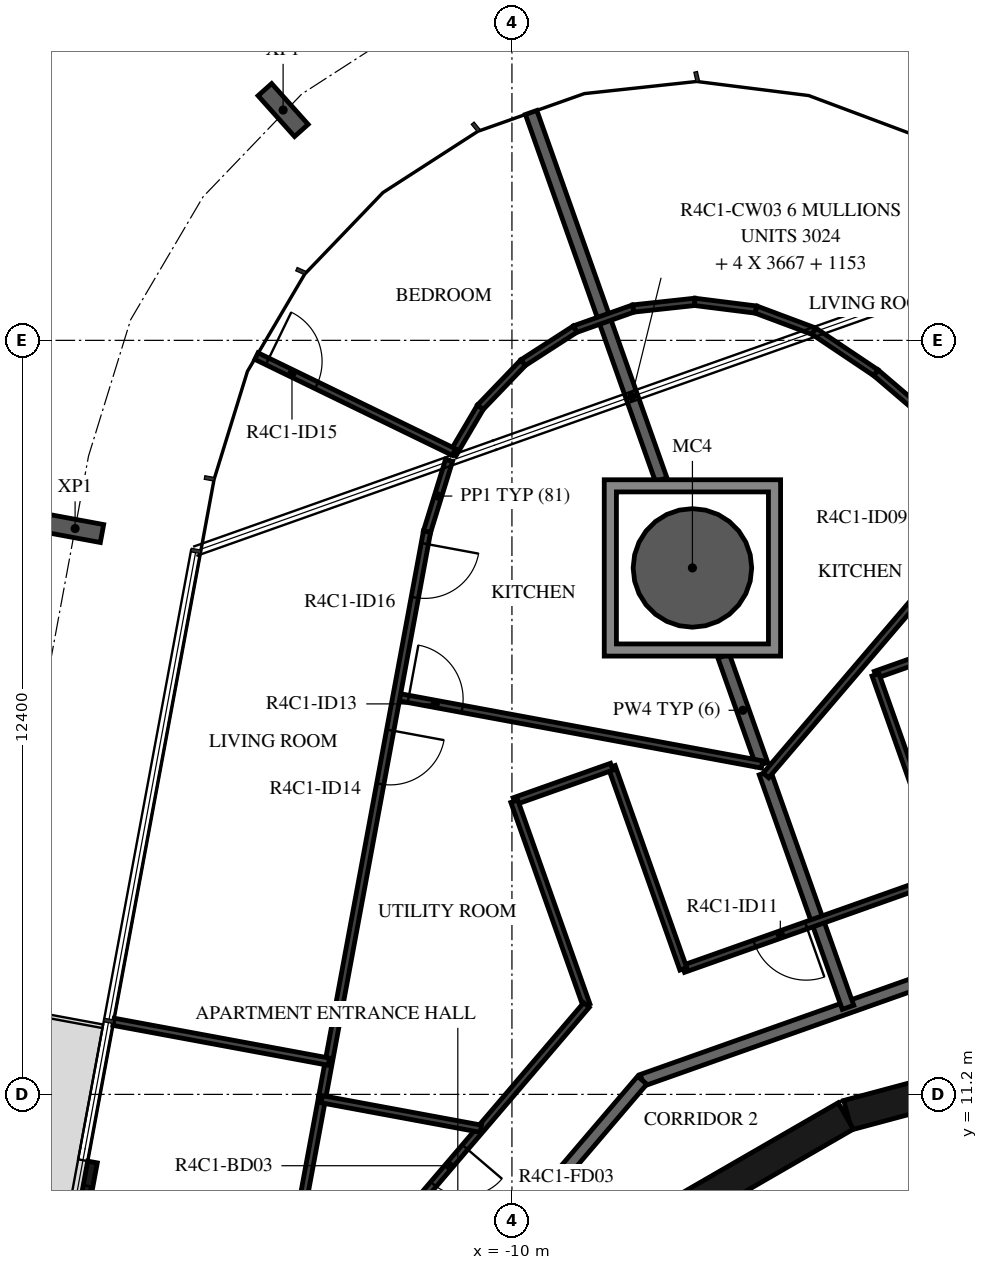
"""IFC4 building model, lengths in metres.
Left out: names, types, materials, properties, quantities, classifications, styles, units other than length and angle.
Written with IfcOpenShell. Run it as: python <this file> out.ifc"""

import sys

from ifc_helpers import new_model, si_unit, direction, frame, frame_2d, origin, origin_2d, place, context, subcontext, project, spatial, polyline, rectangle, hollow_circle, i_section, outline, extrude, element, fill, save


model = new_model("IFC4")
c1 = context("Model", 3, precision=1e-05, world=origin(), true_north=direction((0.0, 1.0)))
c2 = subcontext(c1, "Body", "Model", "MODEL_VIEW")
j1 = project(units=[si_unit("LENGTHUNIT", "METRE"), si_unit("PLANEANGLEUNIT", "RADIAN")], contexts=[c1])
p1 = place(None, origin())
s1 = spatial("IfcSite", under=j1, at=p1, CompositionType="ELEMENT")
p2 = place(p1, origin())
s2 = spatial("IfcBuilding", under=s1, at=p2, CompositionType="ELEMENT")
p3 = place(p2, frame((0.0, 0.0, 176.2)))
s3 = spatial("IfcBuildingStorey", under=s2, at=p3, CompositionType="ELEMENT", Elevation=176.2)
p4 = place(p3, frame((-7.032, 19.858, -0.38), z_axis=(0.0, 0.0, 1.0), x_axis=(1.0, 0.0, 0.0)))
e1 = element("IfcColumn", 1, at=p4, inside=s3, PredefinedType="COLUMN", context=c2, shape_type="SweptSolid", body=[
    extrude(hollow_circle(Radius=0.975, WallThickness=0.045, at=origin_2d()), origin(), (0.0, 0.0, 1.0), 3.5),
])
for number, where, z_axis, x_axis in (
    (2, (-13.763, 27.387, -0.38), (0.0, 0.0, 1.0), (0.746, 0.666, 0.0)),
    (3, (-17.184, 20.505, -0.38), (0.0, 0.0, 1.0), (0.182, 0.983, 0.0)),
):
    element("IfcColumn", number, at=place(p3, frame(where, z_axis=z_axis, x_axis=x_axis)), inside=s3, PredefinedType="COLUMN", context=c2, shape_type="SweptSolid", body=[
        extrude(i_section(OverallWidth=0.3, OverallDepth=0.9, WebThickness=0.019, FlangeThickness=0.035, FilletRadius=0.03, at=origin_2d()), origin(), (0.0, 0.0, 1.0), 3.5),
    ])
p5 = place(p3, frame((-16.897, 10.088, 0.0), z_axis=(0.0, 0.0, 1.0), x_axis=(-0.18226136951, -0.983250117307, 0.0)))
e4 = element("IfcWall", 4, at=p5, inside=s3, PredefinedType="STANDARD", context=c2, shape_type="SweptSolid", body=[
    extrude(rectangle(XDim=3.2, YDim=0.16, at=frame_2d((1.6, 0.0))), origin(), (0.0, 0.0, 1.0), 3.12),
])
p6 = place(p5, frame((0.4, 0.0, 0.0)))
e5 = element("IfcOpeningElement", 5, at=p6, cuts=e4, PredefinedType="OPENING", context=c2, shape_type="SweptSolid", body=[
    extrude(rectangle(XDim=2.4, YDim=2.4, at=frame_2d((1.2, 1.2))), frame((0.0, 0.09, 0.0), z_axis=(0.0, -1.0, 0.0), x_axis=(1.0, 0.0, 0.0)), (0.0, 0.0, 1.0), 0.18),
])
for number, where, z_axis, x_axis in (
    (6, (-1.55, 11.643, 0.0), (0.0, 0.0, 1.0), (-0.966, -0.259, 0.0)),
    (7, (-4.51, 10.845, 0.0), (0.0, 0.0, 1.0), (-0.866, -0.5, 0.0)),
):
    element("IfcWall", number, at=place(p3, frame(where, z_axis=z_axis, x_axis=x_axis)), inside=s3, PredefinedType="SHEAR", context=c2, shape_type="SweptSolid", body=[
        extrude(rectangle(XDim=3.033, YDim=0.5, at=frame_2d((1.516, 0.0))), origin(), (0.0, 0.0, 1.0), 3.12),
    ])
p7 = place(p3, frame((-2.359, 13.38, 0.0), z_axis=(0.0, 0.0, 1.0), x_axis=(-0.942647529236, -0.333789807551, 0.0)))
e8 = element("IfcWall", 8, at=p7, inside=s3, PredefinedType="STANDARD", context=c2, shape_type="SweptSolid", body=[
    extrude(rectangle(XDim=5.833, YDim=0.2, at=frame_2d((2.917, 0.0))), origin(), (0.0, 0.0, 1.0), 3.12),
])
p8 = place(p3, frame((-7.858, 11.433, 0.0), z_axis=(0.0, 0.0, 1.0), x_axis=(-0.649440801937, -0.760412154545, 0.0)))
e9 = element("IfcWall", 9, at=p8, inside=s3, PredefinedType="STANDARD", context=c2, shape_type="SweptSolid", body=[
    extrude(rectangle(XDim=7.181, YDim=0.2, at=frame_2d((3.59, 0.0))), origin(), (0.0, 0.0, 1.0), 3.12),
])
p9 = place(p8, frame((2.6, 0.0, 0.0)))
e10 = element("IfcOpeningElement", 10, at=p9, cuts=e9, PredefinedType="OPENING", context=c2, shape_type="SweptSolid", body=[
    extrude(rectangle(XDim=1.0, YDim=2.1, at=frame_2d((0.5, 1.05))), frame((0.0, 0.11, 0.0), z_axis=(0.0, -1.0, 0.0), x_axis=(1.0, 0.0, 0.0)), (0.0, 0.0, 1.0), 0.22),
])
p10 = place(p3, frame((-5.839, 16.488, 0.0), z_axis=(0.0, 0.0, 1.0), x_axis=(0.333840515054, -0.942629572265, 0.0)))
e11 = element("IfcWall", 11, at=p10, inside=s3, PredefinedType="STANDARD", context=c2, shape_type="SweptSolid", body=[
    extrude(rectangle(XDim=4.092, YDim=0.2, at=frame_2d((2.046, 0.0))), origin(), (0.0, 0.0, 1.0), 3.12),
])
p11 = place(p3, frame((-9.684, 27.348, 0.0), z_axis=(0.0, 0.0, 1.0), x_axis=(0.333810465454, -0.942640214055, 0.0)))
e12 = element("IfcWall", 12, at=p11, inside=s3, PredefinedType="STANDARD", context=c2, shape_type="SweptSolid", body=[
    extrude(rectangle(XDim=6.407, YDim=0.2, at=frame_2d((3.204, 0.0))), origin(), (0.0, 0.0, 1.0), 3.12),
])
p12 = place(p3, frame((-6.518, 18.408, 0.0), z_axis=(0.0, 0.0, 1.0), x_axis=(0.333725210903, -0.942670400303, 0.0)))
e13 = element("IfcWall", 13, at=p12, inside=s3, PredefinedType="STANDARD", context=c2, shape_type="SweptSolid", body=[
    extrude(rectangle(XDim=1.89, YDim=0.2, at=frame_2d((0.945, 0.0))), origin(), (0.0, 0.0, 1.0), 3.12),
])
p13 = place(p3, frame((8.702, 12.206, 0.0), z_axis=(0.0, 0.0, 1.0), x_axis=(-0.760401313718, 0.649453494945, 0.0)))
e14 = element("IfcWall", 14, at=p13, inside=s3, PredefinedType="PARTITIONING", context=c2, shape_type="SweptSolid", body=[
    extrude(rectangle(XDim=16.724, YDim=0.12, at=frame_2d((8.362, 0.0))), origin(), (0.0, 0.0, 1.0), 3.12),
])
p14 = place(p13, frame((0.2, 0.0, 0.0)))
e15 = element("IfcOpeningElement", 15, at=p14, cuts=e14, PredefinedType="OPENING", context=c2, shape_type="SweptSolid", body=[
    extrude(rectangle(XDim=0.9, YDim=2.1, at=frame_2d((0.45, 1.05))), frame((0.0, 0.07, 0.0), z_axis=(0.0, -1.0, 0.0), x_axis=(1.0, 0.0, 0.0)), (0.0, 0.0, 1.0), 0.14),
])
p15 = place(p13, frame((8.02, 0.0, 0.0)))
e16 = element("IfcOpeningElement", 16, at=p15, cuts=e14, PredefinedType="OPENING", context=c2, shape_type="SweptSolid", body=[
    extrude(rectangle(XDim=0.9, YDim=2.1, at=frame_2d((0.45, 1.05))), frame((0.0, 0.07, 0.0), z_axis=(0.0, -1.0, 0.0), x_axis=(1.0, 0.0, 0.0)), (0.0, 0.0, 1.0), 0.14),
])
p16 = place(p13, frame((14.412, 0.0, 0.0)))
e17 = element("IfcOpeningElement", 17, at=p16, cuts=e14, PredefinedType="OPENING", context=c2, shape_type="SweptSolid", body=[
    extrude(rectangle(XDim=0.9, YDim=2.1, at=frame_2d((0.45, 1.05))), frame((0.0, 0.07, 0.0), z_axis=(0.0, -1.0, 0.0), x_axis=(1.0, 0.0, 0.0)), (0.0, 0.0, 1.0), 0.14),
])
p17 = place(p3, frame((-2.419, 18.668, 0.0), z_axis=(0.0, 0.0, 1.0), x_axis=(-0.942661115325, -0.333751436931, 0.0)))
e18 = element("IfcWall", 18, at=p17, inside=s3, PredefinedType="PARTITIONING", context=c2, shape_type="SweptSolid", body=[
    extrude(rectangle(XDim=1.7, YDim=0.12, at=frame_2d((0.85, 0.0))), origin(), (0.0, 0.0, 1.0), 3.12),
])
p18 = place(p3, frame((-4.021, 18.101, 0.0), z_axis=(0.0, 0.0, 1.0), x_axis=(0.333811035895, -0.942640012048, 0.0)))
e19 = element("IfcWall", 19, at=p18, inside=s3, PredefinedType="PARTITIONING", context=c2, shape_type="SweptSolid", body=[
    extrude(rectangle(XDim=3.505, YDim=0.12, at=frame_2d((1.752, 0.0))), origin(), (0.0, 0.0, 1.0), 3.12),
])
p19 = place(p3, frame((-2.852, 14.797, 0.0), z_axis=(0.0, 0.0, 1.0), x_axis=(-0.942629664375, -0.333840254973, 0.0)))
e20 = element("IfcWall", 20, at=p19, inside=s3, PredefinedType="PARTITIONING", context=c2, shape_type="SweptSolid", body=[
    extrude(rectangle(XDim=4.593, YDim=0.12, at=frame_2d((2.297, 0.0))), origin(), (0.0, 0.0, 1.0), 3.12),
])
p20 = place(p19, frame((2.451, 0.0, 0.0)))
e21 = element("IfcOpeningElement", 21, at=p20, cuts=e20, PredefinedType="OPENING", context=c2, shape_type="SweptSolid", body=[
    extrude(rectangle(XDim=0.9, YDim=2.1, at=frame_2d((0.45, 1.05))), frame((0.0, 0.07, 0.0), z_axis=(0.0, -1.0, 0.0), x_axis=(1.0, 0.0, 0.0)), (0.0, 0.0, 1.0), 0.14),
])
p21 = place(p3, frame((-1.79, 21.167, 0.0), z_axis=(0.0, 0.0, 1.0), x_axis=(-0.649456490412, -0.7603987553, 0.0)))
e22 = element("IfcWall", 22, at=p21, inside=s3, PredefinedType="PARTITIONING", context=c2, shape_type="SweptSolid", body=[
    extrude(rectangle(XDim=6.21, YDim=0.12, at=frame_2d((3.105, 0.0))), origin(), (0.0, 0.0, 1.0), 3.12),
])
p22 = place(p21, frame((0.2, 0.0, 0.0)))
e23 = element("IfcOpeningElement", 23, at=p22, cuts=e22, PredefinedType="OPENING", context=c2, shape_type="SweptSolid", body=[
    extrude(rectangle(XDim=0.9, YDim=2.1, at=frame_2d((0.45, 1.05))), frame((0.0, 0.07, 0.0), z_axis=(0.0, -1.0, 0.0), x_axis=(1.0, 0.0, 0.0)), (0.0, 0.0, 1.0), 0.14),
])
p23 = place(p3, frame((-8.961, 23.785, 0.0), z_axis=(0.0, 0.0, 1.0), x_axis=(0.942630376568, 0.333838244022, 0.0)))
e24 = element("IfcWall", 24, at=p23, inside=s3, PredefinedType="PARTITIONING", context=c2, shape_type="SweptSolid", body=[
    extrude(rectangle(XDim=1.016, YDim=0.12, at=frame_2d((0.508, 0.0))), origin(), (0.0, 0.0, 1.0), 3.12),
])
p24 = place(p3, frame((-8.004, 24.124, 0.0), z_axis=(0.0, 0.0, 1.0), x_axis=(0.994216064839, 0.107398400431, 0.0)))
e25 = element("IfcWall", 25, at=p24, inside=s3, PredefinedType="PARTITIONING", context=c2, shape_type="SweptSolid", body=[
    extrude(rectangle(XDim=1.016, YDim=0.12, at=frame_2d((0.508, 0.0))), origin(), (0.0, 0.0, 1.0), 3.12),
])
p25 = place(p3, frame((-6.994, 24.233, 0.0), z_axis=(0.0, 0.0, 1.0), x_axis=(0.992188875952, -0.124744676991, 0.0)))
e26 = element("IfcWall", 26, at=p25, inside=s3, PredefinedType="PARTITIONING", context=c2, shape_type="SweptSolid", body=[
    extrude(rectangle(XDim=1.016, YDim=0.12, at=frame_2d((0.508, 0.0))), origin(), (0.0, 0.0, 1.0), 3.12),
])
p26 = place(p3, frame((-5.986, 24.106, 0.0), z_axis=(0.0, 0.0, 1.0), x_axis=(0.936625084254, -0.350333343469, 0.0)))
e27 = element("IfcWall", 27, at=p26, inside=s3, PredefinedType="PARTITIONING", context=c2, shape_type="SweptSolid", body=[
    extrude(rectangle(XDim=1.016, YDim=0.12, at=frame_2d((0.508, 0.0))), origin(), (0.0, 0.0, 1.0), 3.12),
])
p27 = place(p3, frame((-5.034, 23.75, 0.0), z_axis=(0.0, 0.0, 1.0), x_axis=(0.83070096574, -0.556718874764, 0.0)))
e28 = element("IfcWall", 28, at=p27, inside=s3, PredefinedType="PARTITIONING", context=c2, shape_type="SweptSolid", body=[
    extrude(rectangle(XDim=1.227, YDim=0.12, at=frame_2d((0.614, 0.0))), origin(), (0.0, 0.0, 1.0), 3.12),
])
p28 = place(p3, frame((-7.181, 13.263, 0.0), z_axis=(0.0, 0.0, 1.0), x_axis=(-0.333822798183, 0.942635846663, 0.0)))
e29 = element("IfcWall", 29, at=p28, inside=s3, PredefinedType="PARTITIONING", context=c2, shape_type="SweptSolid", body=[
    extrude(rectangle(XDim=3.527, YDim=0.12, at=frame_2d((1.764, 0.0))), origin(), (0.0, 0.0, 1.0), 3.12),
])
p29 = place(p3, frame((-8.359, 16.588, 0.0), z_axis=(0.0, 0.0, 1.0), x_axis=(-0.942661115325, -0.333751436931, 0.0)))
e30 = element("IfcWall", 30, at=p29, inside=s3, PredefinedType="PARTITIONING", context=c2, shape_type="SweptSolid", body=[
    extrude(rectangle(XDim=1.7, YDim=0.12, at=frame_2d((0.85, 0.0))), origin(), (0.0, 0.0, 1.0), 3.12),
])
p30 = place(p3, frame((-9.961, 16.021, 0.0), z_axis=(0.0, 0.0, 1.0), x_axis=(0.333803930912, -0.94264252806, 0.0)))
e31 = element("IfcWall", 31, at=p30, inside=s3, PredefinedType="PARTITIONING", context=c2, shape_type="SweptSolid", body=[
    extrude(rectangle(XDim=3.556, YDim=0.12, at=frame_2d((1.778, 0.0))), origin(), (0.0, 0.0, 1.0), 3.12),
])
p31 = place(p3, frame((-8.774, 12.669, 0.0), z_axis=(0.0, 0.0, 1.0), x_axis=(-0.649446157105, -0.760407580855, 0.0)))
e32 = element("IfcWall", 32, at=p31, inside=s3, PredefinedType="PARTITIONING", context=c2, shape_type="SweptSolid", body=[
    extrude(rectangle(XDim=7.927, YDim=0.12, at=frame_2d((3.964, 0.0))), origin(), (0.0, 0.0, 1.0), 3.12),
])
p32 = place(p31, frame((3.074, 0.0, 0.0)))
e33 = element("IfcOpeningElement", 33, at=p32, cuts=e32, PredefinedType="OPENING", context=c2, shape_type="SweptSolid", body=[
    extrude(rectangle(XDim=0.8, YDim=2.1, at=frame_2d((0.4, 1.05))), frame((0.0, 0.07, 0.0), z_axis=(0.0, -1.0, 0.0), x_axis=(1.0, 0.0, 0.0)), (0.0, 0.0, 1.0), 0.14),
])
p33 = place(p3, frame((-13.955, 6.647, 0.0), z_axis=(0.0, 0.0, 1.0), x_axis=(0.182264522222, 0.983249532896, 0.0)))
e34 = element("IfcWall", 34, at=p33, inside=s3, PredefinedType="PARTITIONING", context=c2, shape_type="SweptSolid", body=[
    extrude(rectangle(XDim=4.589, YDim=0.12, at=frame_2d((2.294, 0.0))), origin(), (0.0, 0.0, 1.0), 3.12),
])
p34 = place(p3, frame((-10.974, 21.728, 0.0), z_axis=(0.0, 0.0, 1.0), x_axis=(0.507353148194, 0.861738233466, 0.0)))
e35 = element("IfcWall", 35, at=p34, inside=s3, PredefinedType="PARTITIONING", context=c2, shape_type="SweptSolid", body=[
    extrude(rectangle(XDim=0.897, YDim=0.12, at=frame_2d((0.448, 0.0))), origin(), (0.0, 0.0, 1.0), 3.12),
])
p35 = place(p3, frame((-10.519, 22.501, 0.0), z_axis=(0.0, 0.0, 1.0), x_axis=(0.69266189308, 0.721262436201, 0.0)))
e36 = element("IfcWall", 36, at=p35, inside=s3, PredefinedType="PARTITIONING", context=c2, shape_type="SweptSolid", body=[
    extrude(rectangle(XDim=1.016, YDim=0.12, at=frame_2d((0.508, 0.0))), origin(), (0.0, 0.0, 1.0), 3.12),
])
p36 = place(p3, frame((-9.815, 23.234, 0.0), z_axis=(0.0, 0.0, 1.0), x_axis=(0.840310772539, 0.542104976508, 0.0)))
e37 = element("IfcWall", 37, at=p36, inside=s3, PredefinedType="PARTITIONING", context=c2, shape_type="SweptSolid", body=[
    extrude(rectangle(XDim=1.016, YDim=0.12, at=frame_2d((0.508, 0.0))), origin(), (0.0, 0.0, 1.0), 3.12),
])
p37 = place(p3, frame((-14.202, 23.341, 0.0), z_axis=(0.0, 0.0, 1.0), x_axis=(0.899466404534, -0.436989916491, 0.0)))
e38 = element("IfcWall", 38, at=p37, inside=s3, PredefinedType="PARTITIONING", context=c2, shape_type="SweptSolid", body=[
    extrude(rectangle(XDim=3.611, YDim=0.12, at=frame_2d((1.806, 0.0))), origin(), (0.0, 0.0, 1.0), 3.12),
])
p38 = place(p37, frame((0.2, 0.0, 0.0)))
e39 = element("IfcOpeningElement", 39, at=p38, cuts=e38, PredefinedType="OPENING", context=c2, shape_type="SweptSolid", body=[
    extrude(rectangle(XDim=0.9, YDim=2.1, at=frame_2d((0.45, 1.05))), frame((0.0, 0.07, 0.0), z_axis=(0.0, -1.0, 0.0), x_axis=(1.0, 0.0, 0.0)), (0.0, 0.0, 1.0), 0.14),
])
p39 = place(p3, frame((-11.899, 17.74, 0.0), z_axis=(0.0, 0.0, 1.0), x_axis=(0.983254721409, -0.182236529889, 0.0)))
e40 = element("IfcWall", 40, at=p39, inside=s3, PredefinedType="PARTITIONING", context=c2, shape_type="SweptSolid", body=[
    extrude(rectangle(XDim=6.114, YDim=0.12, at=frame_2d((3.057, 0.0))), origin(), (0.0, 0.0, 1.0), 3.12),
])
p40 = place(p39, frame((0.2, 0.0, 0.0)))
e41 = element("IfcOpeningElement", 41, at=p40, cuts=e40, PredefinedType="OPENING", context=c2, shape_type="SweptSolid", body=[
    extrude(rectangle(XDim=0.9, YDim=2.1, at=frame_2d((0.45, 1.05))), frame((0.0, 0.07, 0.0), z_axis=(0.0, -1.0, 0.0), x_axis=(1.0, 0.0, 0.0)), (0.0, 0.0, 1.0), 0.14),
])
p41 = place(p3, frame((-11.034, 21.625, 0.0), z_axis=(0.0, 0.0, 1.0), x_axis=(-0.295260042089, -0.955416928647, 0.0)))
e42 = element("IfcWall", 42, at=p41, inside=s3, PredefinedType="PARTITIONING", context=c2, shape_type="SweptSolid", body=[
    extrude(rectangle(XDim=1.227, YDim=0.12, at=frame_2d((0.614, 0.0))), origin(), (0.0, 0.0, 1.0), 3.12),
])
p42 = place(p3, frame((-11.396, 20.453, 0.0), z_axis=(0.0, 0.0, 1.0), x_axis=(-0.182223370439, -0.983257160292, 0.0)))
e43 = element("IfcWall", 43, at=p42, inside=s3, PredefinedType="PARTITIONING", context=c2, shape_type="SweptSolid", body=[
    extrude(rectangle(XDim=9.452, YDim=0.12, at=frame_2d((4.726, 0.0))), origin(), (0.0, 0.0, 1.0), 3.12),
])
p43 = place(p42, frame((3.319, 0.0, 0.0)))
e44 = element("IfcOpeningElement", 44, at=p43, cuts=e43, PredefinedType="OPENING", context=c2, shape_type="SweptSolid", body=[
    extrude(rectangle(XDim=0.9, YDim=2.1, at=frame_2d((0.45, 1.05))), frame((0.0, 0.07, 0.0), z_axis=(0.0, -1.0, 0.0), x_axis=(1.0, 0.0, 0.0)), (0.0, 0.0, 1.0), 0.14),
])
p44 = place(p42, frame((0.2, 0.0, 0.0)))
e45 = element("IfcOpeningElement", 45, at=p44, cuts=e43, PredefinedType="OPENING", context=c2, shape_type="SweptSolid", body=[
    extrude(rectangle(XDim=0.9, YDim=2.1, at=frame_2d((0.45, 1.05))), frame((0.0, 0.07, 0.0), z_axis=(0.0, -1.0, 0.0), x_axis=(1.0, 0.0, 0.0)), (0.0, 0.0, 1.0), 0.14),
])
p45 = place(p3, frame((-13.126, 11.12, 0.0), z_axis=(0.0, 0.0, 1.0), x_axis=(0.983257646361, -0.182220747645, 0.0)))
e46 = element("IfcWall", 46, at=p45, inside=s3, PredefinedType="PARTITIONING", context=c2, shape_type="SweptSolid", body=[
    extrude(rectangle(XDim=2.659, YDim=0.12, at=frame_2d((1.33, 0.0))), origin(), (0.0, 0.0, 1.0), 3.12),
])
p46 = place(p3, frame((-16.552, 12.394, 0.0), z_axis=(0.0, 0.0, 1.0), x_axis=(0.983257712156, -0.182220392618, 0.0)))
e47 = element("IfcWall", 47, at=p46, inside=s3, PredefinedType="PARTITIONING", context=c2, shape_type="SweptSolid", body=[
    extrude(rectangle(XDim=3.6, YDim=0.12, at=frame_2d((1.8, 0.0))), origin(), (0.0, 0.0, 1.0), 2.73),
])
p47 = place(p3, origin())
e48 = element("IfcWall", 48, at=p47, inside=s3, PredefinedType="STANDARD", context=c2, shape_type="SweptSolid", body=[
    extrude(outline(polyline([(-5.582, 21.308), (-5.582, 18.408), (-8.482, 18.408), (-8.482, 21.308), (-5.582, 21.308)]), holes=[polyline([(-8.282, 18.608), (-5.782, 18.608), (-5.782, 21.108), (-8.282, 21.108), (-8.282, 18.608)])]), origin(), (0.0, 0.0, 1.0), 3.12),
])
p48 = place(p6, origin())
e49 = element("IfcDoor", 49, at=p48, inside=s3, OperationType="DOUBLE_DOOR_SLIDING", PredefinedType="DOOR", context=c2, shape_type="SweptSolid", body=[
    extrude(rectangle(XDim=2.4, YDim=2.4, at=frame_2d((1.2, 1.2))), frame((0.0, 0.025, 0.0), z_axis=(0.0, -1.0, 0.0), x_axis=(1.0, 0.0, 0.0)), (0.0, 0.0, 1.0), 0.05),
])
fill(e5, e49)
p49 = place(p20, origin())
e50 = element("IfcDoor", 50, at=p49, inside=s3, OperationType="SINGLE_SWING_LEFT", PredefinedType="DOOR", context=c2, shape_type="SweptSolid", body=[
    extrude(rectangle(XDim=0.9, YDim=2.1, at=frame_2d((0.45, 1.05))), frame((0.0, 0.025, 0.0), z_axis=(0.0, -1.0, 0.0), x_axis=(1.0, 0.0, 0.0)), (0.0, 0.0, 1.0), 0.05),
])
fill(e21, e50)
p50 = place(p32, origin())
e51 = element("IfcDoor", 51, at=p50, inside=s3, OperationType="SINGLE_SWING_LEFT", PredefinedType="DOOR", context=c2, shape_type="SweptSolid", body=[
    extrude(rectangle(XDim=0.8, YDim=2.1, at=frame_2d((0.4, 1.05))), frame((0.0, 0.025, 0.0), z_axis=(0.0, -1.0, 0.0), x_axis=(1.0, 0.0, 0.0)), (0.0, 0.0, 1.0), 0.05),
])
fill(e33, e51)
p51 = place(p40, origin())
e52 = element("IfcDoor", 52, at=p51, inside=s3, OperationType="SINGLE_SWING_LEFT", PredefinedType="DOOR", context=c2, shape_type="SweptSolid", body=[
    extrude(rectangle(XDim=0.9, YDim=2.1, at=frame_2d((0.45, 1.05))), frame((0.0, 0.025, 0.0), z_axis=(0.0, -1.0, 0.0), x_axis=(1.0, 0.0, 0.0)), (0.0, 0.0, 1.0), 0.05),
])
fill(e41, e52)
p52 = place(p43, origin())
e53 = element("IfcDoor", 53, at=p52, inside=s3, OperationType="SINGLE_SWING_LEFT", PredefinedType="DOOR", context=c2, shape_type="SweptSolid", body=[
    extrude(rectangle(XDim=0.9, YDim=2.1, at=frame_2d((0.45, 1.05))), frame((0.0, 0.025, 0.0), z_axis=(0.0, -1.0, 0.0), x_axis=(1.0, 0.0, 0.0)), (0.0, 0.0, 1.0), 0.05),
])
fill(e44, e53)
p53 = place(p38, origin())
e54 = element("IfcDoor", 54, at=p53, inside=s3, OperationType="SINGLE_SWING_LEFT", PredefinedType="DOOR", context=c2, shape_type="SweptSolid", body=[
    extrude(rectangle(XDim=0.9, YDim=2.1, at=frame_2d((0.45, 1.05))), frame((0.0, 0.025, 0.0), z_axis=(0.0, -1.0, 0.0), x_axis=(1.0, 0.0, 0.0)), (0.0, 0.0, 1.0), 0.05),
])
fill(e39, e54)
p54 = place(p44, origin())
e55 = element("IfcDoor", 55, at=p54, inside=s3, OperationType="SINGLE_SWING_RIGHT", PredefinedType="DOOR", context=c2, shape_type="SweptSolid", body=[
    extrude(rectangle(XDim=0.9, YDim=2.1, at=frame_2d((0.45, 1.05))), frame((0.0, 0.025, 0.0), z_axis=(0.0, -1.0, 0.0), x_axis=(1.0, 0.0, 0.0)), (0.0, 0.0, 1.0), 0.05),
])
fill(e45, e55)
save(model, sys.argv[1])
